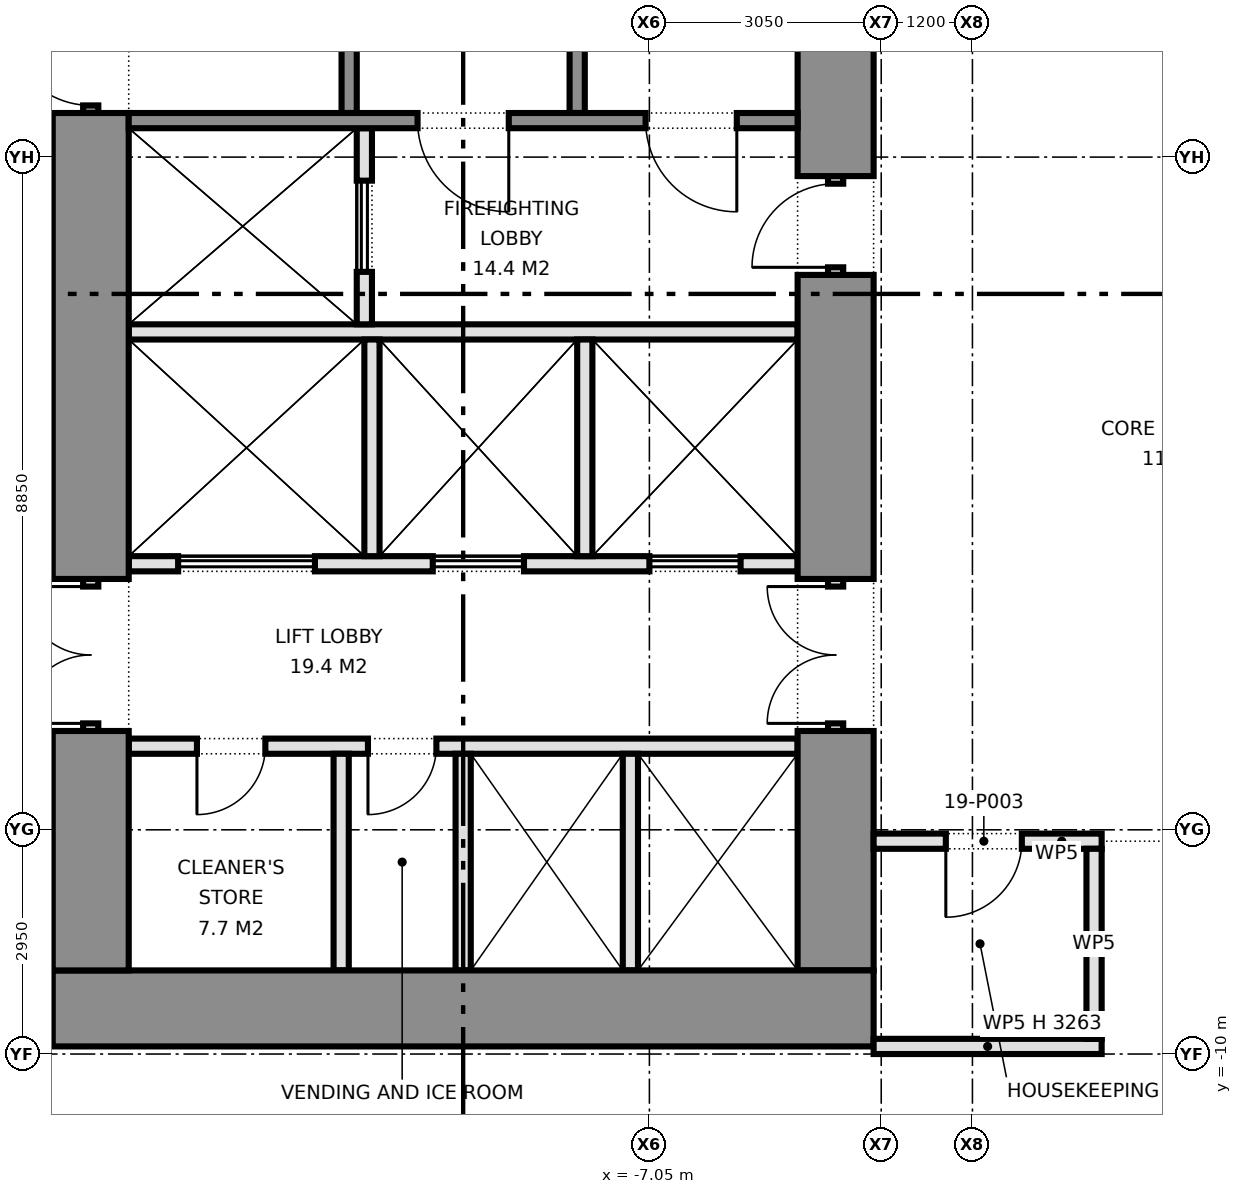
"""IFC4 building model, lengths in metres.
Left out: names, types, materials, properties, quantities, classifications, styles, units other than length and angle.
Written with IfcOpenShell. Run it as: python <this file> out.ifc"""

import sys

from ifc_helpers import new_model, si_unit, direction, frame, frame_2d, origin, place, context, subcontext, project, spatial, rectangle, extrude, element, fill, save


model = new_model("IFC4")
c1 = context("Model", 3, precision=1e-05, world=origin(), true_north=direction((0.0, 1.0)))
c2 = subcontext(c1, "Body", "Model", "MODEL_VIEW")
j1 = project(units=[si_unit("LENGTHUNIT", "METRE"), si_unit("PLANEANGLEUNIT", "RADIAN")], contexts=[c1])
p1 = place(None, origin())
s1 = spatial("IfcSite", under=j1, at=p1, CompositionType="ELEMENT")
p2 = place(p1, origin())
s2 = spatial("IfcBuilding", under=s1, at=p2, CompositionType="ELEMENT")
p3 = place(p2, frame((0.0, 0.0, 86.4)))
s3 = spatial("IfcBuildingStorey", under=s2, at=p3, CompositionType="ELEMENT", Elevation=86.4)
p4 = place(p3, frame((-14.9, -9.4, 0.0), z_axis=(0.0, 0.0, 1.0), x_axis=(1.0, 0.0, 0.0)))
e1 = element("IfcWall", 1, at=p4, inside=s3, PredefinedType="SHEAR", context=c2, shape_type="SweptSolid", body=[
    extrude(rectangle(XDim=10.8, YDim=1.0, at=frame_2d((5.4, 0.0))), origin(), (0.0, 0.0, 1.0), 4.2),
])
p5 = place(p3, frame((-14.4, -8.9, 0.0), z_axis=(0.0, 0.0, 1.0), x_axis=(0.0, 1.0, 0.0)))
e2 = element("IfcWall", 2, at=p5, inside=s3, PredefinedType="SHEAR", context=c2, shape_type="SweptSolid", body=[
    extrude(rectangle(XDim=3.15, YDim=1.0, at=frame_2d((1.575, 0.0))), origin(), (0.0, 0.0, 1.0), 4.2),
])
p6 = place(p3, frame((-14.4, -5.75, 0.0), z_axis=(0.0, 0.0, 1.0), x_axis=(0.0, 1.0, 0.0)))
e3 = element("IfcWall", 3, at=p6, inside=s3, PredefinedType="PARTITIONING", context=c2, shape_type="SweptSolid", body=[
    extrude(rectangle(XDim=2.0, YDim=0.2, at=frame_2d((1.0, 0.0))), origin(), (0.0, 0.0, 1.0), 2.4),
])
p7 = place(p6, frame((0.1, 0.0, 0.0)))
e4 = element("IfcOpeningElement", 4, at=p7, cuts=e3, PredefinedType="OPENING", context=c2, shape_type="SweptSolid", body=[
    extrude(rectangle(XDim=1.8, YDim=2.1, at=frame_2d((0.9, 1.05))), frame((0.0, 0.11, 0.0), z_axis=(0.0, -1.0, 0.0), x_axis=(1.0, 0.0, 0.0)), (0.0, 0.0, 1.0), 0.22),
])
p8 = place(p3, frame((-14.4, -3.75, 0.0), z_axis=(0.0, 0.0, 1.0), x_axis=(0.0, 1.0, 0.0)))
e5 = element("IfcWall", 5, at=p8, inside=s3, PredefinedType="SHEAR", context=c2, shape_type="SweptSolid", body=[
    extrude(rectangle(XDim=6.13, YDim=1.0, at=frame_2d((3.065, 0.0))), origin(), (0.0, 0.0, 1.0), 4.2),
])
p9 = place(p3, frame((-14.4, 2.38, 0.0), z_axis=(0.0, 0.0, 1.0), x_axis=(0.0, 1.0, 0.0)))
e6 = element("IfcWall", 6, at=p9, inside=s3, PredefinedType="SHEAR", context=c2, shape_type="SweptSolid", body=[
    extrude(rectangle(XDim=1.3, YDim=0.2, at=frame_2d((0.65, 0.0))), origin(), (0.0, 0.0, 1.0), 2.4),
])
p10 = place(p9, frame((0.1, 0.0, 0.0)))
e7 = element("IfcOpeningElement", 7, at=p10, cuts=e6, PredefinedType="OPENING", context=c2, shape_type="SweptSolid", body=[
    extrude(rectangle(XDim=1.1, YDim=2.1, at=frame_2d((0.55, 1.05))), frame((0.0, 0.11, 0.0), z_axis=(0.0, -1.0, 0.0), x_axis=(1.0, 0.0, 0.0)), (0.0, 0.0, 1.0), 0.22),
])
p11 = place(p3, frame((-4.6, -8.9, 0.0), z_axis=(0.0, 0.0, 1.0), x_axis=(0.0, 1.0, 0.0)))
e8 = element("IfcWall", 8, at=p11, inside=s3, PredefinedType="SHEAR", context=c2, shape_type="SweptSolid", body=[
    extrude(rectangle(XDim=3.15, YDim=1.0, at=frame_2d((1.575, 0.0))), origin(), (0.0, 0.0, 1.0), 4.2),
])
p12 = place(p3, frame((-4.6, -5.75, 0.0), z_axis=(0.0, 0.0, 1.0), x_axis=(0.0, 1.0, 0.0)))
e9 = element("IfcWall", 9, at=p12, inside=s3, PredefinedType="PARTITIONING", context=c2, shape_type="SweptSolid", body=[
    extrude(rectangle(XDim=2.0, YDim=0.2, at=frame_2d((1.0, 0.0))), origin(), (0.0, 0.0, 1.0), 2.4),
])
p13 = place(p12, frame((0.1, 0.0, 0.0)))
e10 = element("IfcOpeningElement", 10, at=p13, cuts=e9, PredefinedType="OPENING", context=c2, shape_type="SweptSolid", body=[
    extrude(rectangle(XDim=1.8, YDim=2.1, at=frame_2d((0.9, 1.05))), frame((0.0, 0.11, 0.0), z_axis=(0.0, -1.0, 0.0), x_axis=(1.0, 0.0, 0.0)), (0.0, 0.0, 1.0), 0.22),
])
p14 = place(p3, frame((-4.6, -3.75, 0.0), z_axis=(0.0, 0.0, 1.0), x_axis=(0.0, 1.0, 0.0)))
e11 = element("IfcWall", 11, at=p14, inside=s3, PredefinedType="SHEAR", context=c2, shape_type="SweptSolid", body=[
    extrude(rectangle(XDim=4.0, YDim=1.0, at=frame_2d((2.0, 0.0))), origin(), (0.0, 0.0, 1.0), 4.2),
])
p15 = place(p3, frame((-4.6, 0.25, 0.0), z_axis=(0.0, 0.0, 1.0), x_axis=(0.0, 1.0, 0.0)))
e12 = element("IfcWall", 12, at=p15, inside=s3, PredefinedType="PARTITIONING", context=c2, shape_type="SweptSolid", body=[
    extrude(rectangle(XDim=1.3, YDim=0.2, at=frame_2d((0.65, 0.0))), origin(), (0.0, 0.0, 1.0), 2.4),
])
p16 = place(p15, frame((0.1, 0.0, 0.0)))
e13 = element("IfcOpeningElement", 13, at=p16, cuts=e12, PredefinedType="OPENING", context=c2, shape_type="SweptSolid", body=[
    extrude(rectangle(XDim=1.1, YDim=2.1, at=frame_2d((0.55, 1.05))), frame((0.0, 0.11, 0.0), z_axis=(0.0, -1.0, 0.0), x_axis=(1.0, 0.0, 0.0)), (0.0, 0.0, 1.0), 0.22),
])
p17 = place(p3, frame((-4.6, 1.55, 0.0), z_axis=(0.0, 0.0, 1.0), x_axis=(0.0, 1.0, 0.0)))
e14 = element("IfcWall", 14, at=p17, inside=s3, PredefinedType="SHEAR", context=c2, shape_type="SweptSolid", body=[
    extrude(rectangle(XDim=7.35, YDim=1.0, at=frame_2d((3.675, 0.0))), origin(), (0.0, 0.0, 1.0), 4.2),
])
p18 = place(p3, frame((-13.9, -5.95, 0.0), z_axis=(0.0, 0.0, 1.0), x_axis=(1.0, 0.0, 0.0)))
e15 = element("IfcWall", 15, at=p18, inside=s3, PredefinedType="PARTITIONING", context=c2, shape_type="SweptSolid", body=[
    extrude(rectangle(XDim=8.8, YDim=0.2, at=frame_2d((4.4, 0.0))), origin(), (0.0, 0.0, 1.0), 4.2),
])
p19 = place(p18, frame((0.897, 0.0, 0.0)))
e16 = element("IfcOpeningElement", 16, at=p19, cuts=e15, PredefinedType="OPENING", context=c2, shape_type="SweptSolid", body=[
    extrude(rectangle(XDim=0.9, YDim=2.1, at=frame_2d((0.45, 1.05))), frame((0.0, 0.11, 0.0), z_axis=(0.0, -1.0, 0.0), x_axis=(1.0, 0.0, 0.0)), (0.0, 0.0, 1.0), 0.22),
])
p20 = place(p18, frame((3.147, 0.0, 0.0)))
e17 = element("IfcOpeningElement", 17, at=p20, cuts=e15, PredefinedType="OPENING", context=c2, shape_type="SweptSolid", body=[
    extrude(rectangle(XDim=0.9, YDim=2.1, at=frame_2d((0.45, 1.05))), frame((0.0, 0.11, 0.0), z_axis=(0.0, -1.0, 0.0), x_axis=(1.0, 0.0, 0.0)), (0.0, 0.0, 1.0), 0.22),
])
p21 = place(p3, frame((-13.9, -3.55, 0.0), z_axis=(0.0, 0.0, 1.0), x_axis=(1.0, 0.0, 0.0)))
e18 = element("IfcWall", 18, at=p21, inside=s3, PredefinedType="PARTITIONING", context=c2, shape_type="SweptSolid", body=[
    extrude(rectangle(XDim=8.8, YDim=0.2, at=frame_2d((4.4, 0.0))), origin(), (0.0, 0.0, 1.0), 4.2),
])
p22 = place(p21, frame((0.65, 0.0, 0.0)))
e19 = element("IfcOpeningElement", 19, at=p22, cuts=e18, PredefinedType="OPENING", context=c2, shape_type="SweptSolid", body=[
    extrude(rectangle(XDim=1.8, YDim=2.1, at=frame_2d((0.9, 1.05))), frame((0.0, 0.11, 0.0), z_axis=(0.0, -1.0, 0.0), x_axis=(1.0, 0.0, 0.0)), (0.0, 0.0, 1.0), 0.22),
])
p23 = place(p21, frame((4.0, 0.0, 0.0)))
e20 = element("IfcOpeningElement", 20, at=p23, cuts=e18, PredefinedType="OPENING", context=c2, shape_type="SweptSolid", body=[
    extrude(rectangle(XDim=1.2, YDim=2.1, at=frame_2d((0.6, 1.05))), frame((0.0, 0.11, 0.0), z_axis=(0.0, -1.0, 0.0), x_axis=(1.0, 0.0, 0.0)), (0.0, 0.0, 1.0), 0.22),
])
p24 = place(p21, frame((6.85, 0.0, 0.0)))
e21 = element("IfcOpeningElement", 21, at=p24, cuts=e18, PredefinedType="OPENING", context=c2, shape_type="SweptSolid", body=[
    extrude(rectangle(XDim=1.2, YDim=2.1, at=frame_2d((0.6, 1.05))), frame((0.0, 0.11, 0.0), z_axis=(0.0, -1.0, 0.0), x_axis=(1.0, 0.0, 0.0)), (0.0, 0.0, 1.0), 0.22),
])
p25 = place(p3, frame((-13.9, -0.5, 0.0), z_axis=(0.0, 0.0, 1.0), x_axis=(1.0, 0.0, 0.0)))
e22 = element("IfcWall", 22, at=p25, inside=s3, PredefinedType="PARTITIONING", context=c2, shape_type="SweptSolid", body=[
    extrude(rectangle(XDim=8.8, YDim=0.2, at=frame_2d((4.4, 0.0))), origin(), (0.0, 0.0, 1.0), 4.2),
])
p26 = place(p3, frame((-10.8, -0.4, 0.0), z_axis=(0.0, 0.0, 1.0), x_axis=(0.0, 1.0, 0.0)))
e23 = element("IfcWall", 23, at=p26, inside=s3, PredefinedType="PARTITIONING", context=c2, shape_type="SweptSolid", body=[
    extrude(rectangle(XDim=2.58, YDim=0.2, at=frame_2d((1.29, 0.0))), origin(), (0.0, 0.0, 1.0), 4.2),
])
p27 = place(p26, frame((0.69, 0.0, 0.0)))
e24 = element("IfcOpeningElement", 24, at=p27, cuts=e23, PredefinedType="OPENING", context=c2, shape_type="SweptSolid", body=[
    extrude(rectangle(XDim=1.2, YDim=2.1, at=frame_2d((0.6, 1.05))), frame((0.0, 0.11, 0.0), z_axis=(0.0, -1.0, 0.0), x_axis=(1.0, 0.0, 0.0)), (0.0, 0.0, 1.0), 0.22),
])
p28 = place(p3, frame((-13.9, 2.28, 0.0), z_axis=(0.0, 0.0, 1.0), x_axis=(1.0, 0.0, 0.0)))
e25 = element("IfcWall", 25, at=p28, inside=s3, PredefinedType="SHEAR", context=c2, shape_type="SweptSolid", body=[
    extrude(rectangle(XDim=8.8, YDim=0.2, at=frame_2d((4.4, 0.0))), origin(), (0.0, 0.0, 1.0), 4.2),
])
p29 = place(p28, frame((3.8, 0.0, 0.0)))
e26 = element("IfcOpeningElement", 26, at=p29, cuts=e25, PredefinedType="OPENING", context=c2, shape_type="SweptSolid", body=[
    extrude(rectangle(XDim=1.2, YDim=2.1, at=frame_2d((0.6, 1.05))), frame((0.0, 0.11, 0.0), z_axis=(0.0, -1.0, 0.0), x_axis=(1.0, 0.0, 0.0)), (0.0, 0.0, 1.0), 0.22),
])
p30 = place(p28, frame((6.8, 0.0, 0.0)))
e27 = element("IfcOpeningElement", 27, at=p30, cuts=e25, PredefinedType="OPENING", context=c2, shape_type="SweptSolid", body=[
    extrude(rectangle(XDim=1.2, YDim=2.1, at=frame_2d((0.6, 1.05))), frame((0.0, 0.11, 0.0), z_axis=(0.0, -1.0, 0.0), x_axis=(1.0, 0.0, 0.0)), (0.0, 0.0, 1.0), 0.22),
])
for number, where, z_axis, x_axis in (
    (28, (-11.0, 2.38, 0.0), (0.0, 0.0, 1.0), (0.0, 1.0, 0.0)),
    (29, (-8.0, 2.38, 0.0), (0.0, 0.0, 1.0), (0.0, 1.0, 0.0)),
):
    element("IfcWall", number, at=place(p3, frame(where, z_axis=z_axis, x_axis=x_axis)), inside=s3, PredefinedType="SHEAR", context=c2, shape_type="SweptSolid", body=[
        extrude(rectangle(XDim=6.52, YDim=0.2, at=frame_2d((3.26, 0.0))), origin(), (0.0, 0.0, 1.0), 4.2),
    ])
for number, where, z_axis, x_axis in (
    (30, (-9.5, -8.9, 0.0), (0.0, 0.0, 1.0), (0.0, 1.0, 0.0)),
    (31, (-7.3, -8.9, 0.0), (0.0, 0.0, 1.0), (0.0, 1.0, 0.0)),
    (32, (-11.105, -8.9, 0.0), (0.0, 0.0, 1.0), (0.0, 1.0, 0.0)),
    (33, (-10.7, -3.45, 0.0), (0.0, 0.0, 1.0), (0.0, 1.0, 0.0)),
    (34, (-7.9, -3.45, 0.0), (0.0, 0.0, 1.0), (0.0, 1.0, 0.0)),
):
    element("IfcWall", number, at=place(p3, frame(where, z_axis=z_axis, x_axis=x_axis)), inside=s3, PredefinedType="PARTITIONING", context=c2, shape_type="SweptSolid", body=[
        extrude(rectangle(XDim=2.85, YDim=0.2, at=frame_2d((1.425, 0.0))), origin(), (0.0, 0.0, 1.0), 4.2),
    ])
p31 = place(p3, frame((-4.1, -9.9, 0.0), z_axis=(0.0, 0.0, 1.0), x_axis=(1.0, 0.0, 0.0)))
e35 = element("IfcWall", 35, at=p31, inside=s3, PredefinedType="PARTITIONING", context=c2, shape_type="SweptSolid", body=[
    extrude(rectangle(XDim=3.0, YDim=0.2, at=frame_2d((1.5, 0.0))), origin(), (0.0, 0.0, 1.0), 3.263),
])
p32 = place(p3, frame((-4.1, -7.2, 0.0), z_axis=(0.0, 0.0, 1.0), x_axis=(1.0, 0.0, 0.0)))
e36 = element("IfcWall", 36, at=p32, inside=s3, PredefinedType="PARTITIONING", context=c2, shape_type="SweptSolid", body=[
    extrude(rectangle(XDim=3.0, YDim=0.2, at=frame_2d((1.5, 0.0))), origin(), (0.0, 0.0, 1.0), 4.2),
])
p33 = place(p32, frame((0.95, 0.0, 0.0)))
e37 = element("IfcOpeningElement", 37, at=p33, cuts=e36, PredefinedType="OPENING", context=c2, shape_type="SweptSolid", body=[
    extrude(rectangle(XDim=1.0, YDim=2.1, at=frame_2d((0.5, 1.05))), frame((0.0, 0.11, 0.0), z_axis=(0.0, -1.0, 0.0), x_axis=(1.0, 0.0, 0.0)), (0.0, 0.0, 1.0), 0.22),
])
p34 = place(p3, frame((-1.2, -9.8, 0.0), z_axis=(0.0, 0.0, 1.0), x_axis=(0.0, 1.0, 0.0)))
e38 = element("IfcWall", 38, at=p34, inside=s3, PredefinedType="PARTITIONING", context=c2, shape_type="SweptSolid", body=[
    extrude(rectangle(XDim=2.5, YDim=0.2, at=frame_2d((1.25, 0.0))), origin(), (0.0, 0.0, 1.0), 4.2),
])
p35 = place(p7, origin())
e39 = element("IfcDoor", 39, at=p35, inside=s3, OperationType="DOUBLE_DOOR_SINGLE_SWING", PredefinedType="DOOR", context=c2, shape_type="SweptSolid", body=[
    extrude(rectangle(XDim=1.8, YDim=2.1, at=frame_2d((0.9, 1.05))), frame((0.0, 0.025, 0.0), z_axis=(0.0, -1.0, 0.0), x_axis=(1.0, 0.0, 0.0)), (0.0, 0.0, 1.0), 0.05),
])
fill(e4, e39)
p36 = place(p10, origin())
e40 = element("IfcDoor", 40, at=p36, inside=s3, OperationType="SINGLE_SWING_RIGHT", PredefinedType="DOOR", context=c2, shape_type="SweptSolid", body=[
    extrude(rectangle(XDim=1.1, YDim=2.1, at=frame_2d((0.55, 1.05))), frame((0.0, 0.025, 0.0), z_axis=(0.0, -1.0, 0.0), x_axis=(1.0, 0.0, 0.0)), (0.0, 0.0, 1.0), 0.05),
])
fill(e7, e40)
p37 = place(p13, origin())
e41 = element("IfcDoor", 41, at=p37, inside=s3, OperationType="DOUBLE_DOOR_SINGLE_SWING", PredefinedType="DOOR", context=c2, shape_type="SweptSolid", body=[
    extrude(rectangle(XDim=1.8, YDim=2.1, at=frame_2d((0.9, 1.05))), frame((0.0, 0.025, 0.0), z_axis=(0.0, -1.0, 0.0), x_axis=(1.0, 0.0, 0.0)), (0.0, 0.0, 1.0), 0.05),
])
fill(e10, e41)
p38 = place(p16, origin())
e42 = element("IfcDoor", 42, at=p38, inside=s3, OperationType="SINGLE_SWING_LEFT", PredefinedType="DOOR", context=c2, shape_type="SweptSolid", body=[
    extrude(rectangle(XDim=1.1, YDim=2.1, at=frame_2d((0.55, 1.05))), frame((0.0, 0.025, 0.0), z_axis=(0.0, -1.0, 0.0), x_axis=(1.0, 0.0, 0.0)), (0.0, 0.0, 1.0), 0.05),
])
fill(e13, e42)
p39 = place(p22, origin())
e43 = element("IfcDoor", 43, at=p39, inside=s3, OperationType="DOUBLE_DOOR_SLIDING", PredefinedType="DOOR", context=c2, shape_type="SweptSolid", body=[
    extrude(rectangle(XDim=1.8, YDim=2.1, at=frame_2d((0.9, 1.05))), frame((0.0, 0.025, 0.0), z_axis=(0.0, -1.0, 0.0), x_axis=(1.0, 0.0, 0.0)), (0.0, 0.0, 1.0), 0.05),
])
fill(e19, e43)
p40 = place(p23, origin())
e44 = element("IfcDoor", 44, at=p40, inside=s3, OperationType="DOUBLE_DOOR_SLIDING", PredefinedType="DOOR", context=c2, shape_type="SweptSolid", body=[
    extrude(rectangle(XDim=1.2, YDim=2.1, at=frame_2d((0.6, 1.05))), frame((0.0, 0.025, 0.0), z_axis=(0.0, -1.0, 0.0), x_axis=(1.0, 0.0, 0.0)), (0.0, 0.0, 1.0), 0.05),
])
fill(e20, e44)
p41 = place(p24, origin())
e45 = element("IfcDoor", 45, at=p41, inside=s3, OperationType="DOUBLE_DOOR_SLIDING", PredefinedType="DOOR", context=c2, shape_type="SweptSolid", body=[
    extrude(rectangle(XDim=1.2, YDim=2.1, at=frame_2d((0.6, 1.05))), frame((0.0, 0.025, 0.0), z_axis=(0.0, -1.0, 0.0), x_axis=(1.0, 0.0, 0.0)), (0.0, 0.0, 1.0), 0.05),
])
fill(e21, e45)
p42 = place(p27, origin())
e46 = element("IfcDoor", 46, at=p42, inside=s3, OperationType="DOUBLE_DOOR_SLIDING", PredefinedType="DOOR", context=c2, shape_type="SweptSolid", body=[
    extrude(rectangle(XDim=1.2, YDim=2.1, at=frame_2d((0.6, 1.05))), frame((0.0, 0.025, 0.0), z_axis=(0.0, -1.0, 0.0), x_axis=(1.0, 0.0, 0.0)), (0.0, 0.0, 1.0), 0.05),
])
fill(e24, e46)
p43 = place(p19, frame((0.9, 0.0, 0.0), z_axis=(0.0, 0.0, 1.0), x_axis=(-1.0, 0.0, 0.0)))
e47 = element("IfcDoor", 47, at=p43, inside=s3, OperationType="SINGLE_SWING_RIGHT", PredefinedType="DOOR", context=c2, shape_type="SweptSolid", body=[
    extrude(rectangle(XDim=0.9, YDim=2.1, at=frame_2d((0.45, 1.05))), frame((0.0, 0.025, 0.0), z_axis=(0.0, -1.0, 0.0), x_axis=(1.0, 0.0, 0.0)), (0.0, 0.0, 1.0), 0.05),
])
fill(e16, e47)
p44 = place(p20, frame((0.9, 0.0, 0.0), z_axis=(0.0, 0.0, 1.0), x_axis=(-1.0, 0.0, 0.0)))
e48 = element("IfcDoor", 48, at=p44, inside=s3, OperationType="SINGLE_SWING_RIGHT", PredefinedType="DOOR", context=c2, shape_type="SweptSolid", body=[
    extrude(rectangle(XDim=0.9, YDim=2.1, at=frame_2d((0.45, 1.05))), frame((0.0, 0.025, 0.0), z_axis=(0.0, -1.0, 0.0), x_axis=(1.0, 0.0, 0.0)), (0.0, 0.0, 1.0), 0.05),
])
fill(e17, e48)
p45 = place(p29, frame((1.2, 0.0, 0.0), z_axis=(0.0, 0.0, 1.0), x_axis=(-1.0, 0.0, 0.0)))
e49 = element("IfcDoor", 49, at=p45, inside=s3, OperationType="SINGLE_SWING_LEFT", PredefinedType="DOOR", context=c2, shape_type="SweptSolid", body=[
    extrude(rectangle(XDim=1.2, YDim=2.1, at=frame_2d((0.6, 1.05))), frame((0.0, 0.025, 0.0), z_axis=(0.0, -1.0, 0.0), x_axis=(1.0, 0.0, 0.0)), (0.0, 0.0, 1.0), 0.05),
])
fill(e26, e49)
p46 = place(p30, frame((1.2, 0.0, 0.0), z_axis=(0.0, 0.0, 1.0), x_axis=(-1.0, 0.0, 0.0)))
e50 = element("IfcDoor", 50, at=p46, inside=s3, OperationType="SINGLE_SWING_LEFT", PredefinedType="DOOR", context=c2, shape_type="SweptSolid", body=[
    extrude(rectangle(XDim=1.2, YDim=2.1, at=frame_2d((0.6, 1.05))), frame((0.0, 0.025, 0.0), z_axis=(0.0, -1.0, 0.0), x_axis=(1.0, 0.0, 0.0)), (0.0, 0.0, 1.0), 0.05),
])
fill(e27, e50)
p47 = place(p33, frame((1.0, 0.0, 0.0), z_axis=(0.0, 0.0, 1.0), x_axis=(-1.0, 0.0, 0.0)))
e51 = element("IfcDoor", 51, at=p47, inside=s3, OperationType="SINGLE_SWING_RIGHT", PredefinedType="DOOR", context=c2, shape_type="SweptSolid", body=[
    extrude(rectangle(XDim=1.0, YDim=2.1, at=frame_2d((0.5, 1.05))), frame((0.0, 0.025, 0.0), z_axis=(0.0, -1.0, 0.0), x_axis=(1.0, 0.0, 0.0)), (0.0, 0.0, 1.0), 0.05),
])
fill(e37, e51)
save(model, sys.argv[1])
